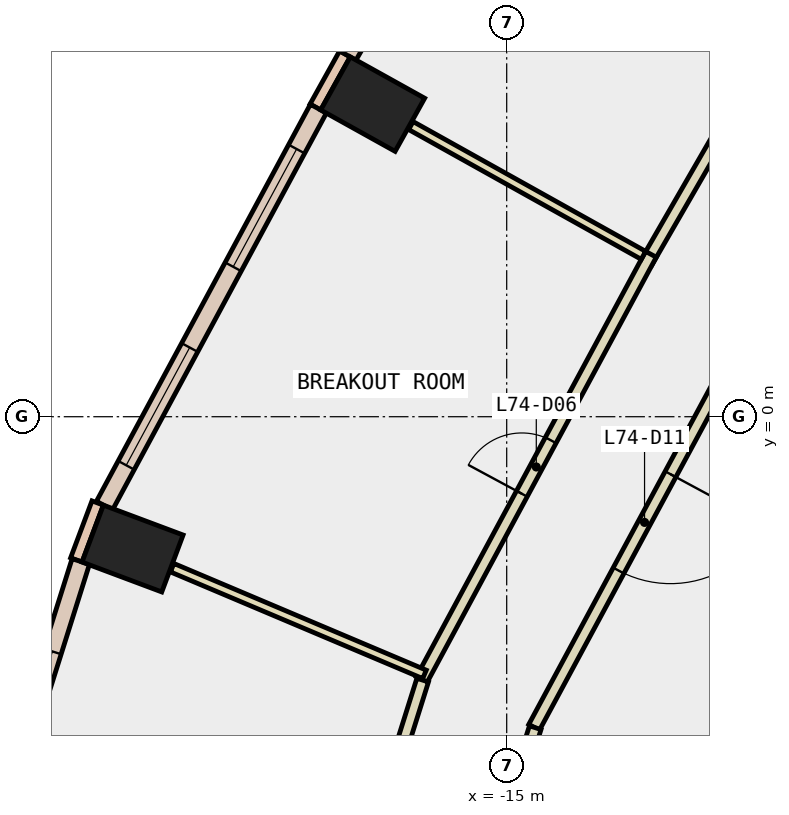
"""IFC4 building model, lengths in metres.
Left out: names, types, materials, properties, quantities, classifications, styles, units other than length and angle.
Written with IfcOpenShell. Run it as: python <this file> out.ifc"""

import sys

from ifc_helpers import new_model, si_unit, direction, frame, frame_2d, origin, origin_2d, place, context, subcontext, project, spatial, rectangle, extrude, element, fill, save


model = new_model("IFC4")
c1 = context("Model", 3, precision=1e-05, world=origin(), true_north=direction((0.0, 1.0)))
c2 = subcontext(c1, "Body", "Model", "MODEL_VIEW")
j1 = project(units=[si_unit("LENGTHUNIT", "METRE"), si_unit("PLANEANGLEUNIT", "RADIAN")], contexts=[c1])
p1 = place(None, origin())
s1 = spatial("IfcSite", under=j1, at=p1, CompositionType="ELEMENT")
p2 = place(p1, origin())
s2 = spatial("IfcBuilding", under=s1, at=p2, CompositionType="ELEMENT")
p3 = place(p2, frame((0.0, 0.0, 315.2)))
s3 = spatial("IfcBuildingStorey", under=s2, at=p3, CompositionType="ELEMENT", Elevation=315.2)
for number, where, z_axis, x_axis in (
    (1, (-17.204, 5.141, -0.34), (0.0, 0.0, 1.0), (0.486, 0.874, 0.0)),
    (2, (-21.153, -2.168, -0.34), (0.0, 0.0, 1.0), (0.351, 0.936, 0.0)),
):
    element("IfcColumn", number, at=place(p3, frame(where, z_axis=z_axis, x_axis=x_axis)), inside=s3, PredefinedType="COLUMN", context=c2, shape_type="SweptSolid", body=[
        extrude(rectangle(XDim=1.0, YDim=1.4, at=origin_2d()), origin(), (0.0, 0.0, 1.0), 3.6),
    ])
p4 = place(p3, frame((-6.279, -3.625, -0.34), z_axis=(0.0, 0.0, 1.0), x_axis=(-0.866017533419, -0.500013631625, 0.0)))
e3 = element("IfcWall", 3, at=p4, inside=s3, PredefinedType="SHEAR", context=c2, shape_type="SweptSolid", body=[
    extrude(rectangle(XDim=9.0, YDim=0.8, at=frame_2d((4.5, 0.0))), origin(), (0.0, 0.0, 1.0), 3.6),
])
p5 = place(p3, frame((-17.661, 5.966, 0.0), z_axis=(0.0, 0.0, 1.0), x_axis=(-0.486036693078, -0.873938403425, 0.0)))
e4 = element("IfcWall", 4, at=p5, inside=s3, PredefinedType="STANDARD", context=c2, shape_type="SweptSolid", body=[
    extrude(rectangle(XDim=1.0, YDim=0.2, at=frame_2d((0.5, 0.0))), origin(), (0.0, 0.0, 1.0), 3.26),
])
p6 = place(p3, frame((-21.727, -1.419, 0.0), z_axis=(0.0, 0.0, 1.0), x_axis=(-0.350962844851, -0.936389385637, 0.0)))
e5 = element("IfcWall", 5, at=p6, inside=s3, PredefinedType="STANDARD", context=c2, shape_type="SweptSolid", body=[
    extrude(rectangle(XDim=1.0, YDim=0.2, at=frame_2d((0.5, 0.0))), origin(), (0.0, 0.0, 1.0), 3.26),
])
p7 = place(p3, frame((-13.947, 12.283, 0.0), z_axis=(0.0, 0.0, 1.0), x_axis=(-0.499923391538, -0.866069629183, 0.0)))
e6 = element("IfcWall", 6, at=p7, inside=s3, PredefinedType="STANDARD", context=c2, shape_type="SweptSolid", body=[
    extrude(rectangle(XDim=7.327, YDim=0.3, at=frame_2d((3.664, 0.0))), origin(), (0.0, 0.0, 1.0), 3.26),
])
p8 = place(p7, frame((0.732, 0.0, 0.9)))
e7 = element("IfcOpeningElement", 7, at=p8, cuts=e6, PredefinedType="OPENING", context=c2, shape_type="SweptSolid", body=[
    extrude(rectangle(XDim=2.2, YDim=2.0, at=frame_2d((1.1, 1.0))), frame((0.0, 0.16, 0.0), z_axis=(0.0, -1.0, 0.0), x_axis=(1.0, 0.0, 0.0)), (0.0, 0.0, 1.0), 0.32),
])
p9 = place(p7, frame((4.395, 0.0, 0.9)))
e8 = element("IfcOpeningElement", 8, at=p9, cuts=e6, PredefinedType="OPENING", context=c2, shape_type="SweptSolid", body=[
    extrude(rectangle(XDim=2.2, YDim=2.0, at=frame_2d((1.1, 1.0))), frame((0.0, 0.16, 0.0), z_axis=(0.0, -1.0, 0.0), x_axis=(1.0, 0.0, 0.0)), (0.0, 0.0, 1.0), 0.32),
])
p10 = place(p3, frame((-18.097, 5.066, 0.0), z_axis=(0.0, 0.0, 1.0), x_axis=(-0.474421773145, -0.880297666228, 0.0)))
e9 = element("IfcWall", 9, at=p10, inside=s3, PredefinedType="STANDARD", context=c2, shape_type="SweptSolid", body=[
    extrude(rectangle(XDim=7.416, YDim=0.3, at=frame_2d((3.708, 0.0))), origin(), (0.0, 0.0, 1.0), 3.26),
])
p11 = place(p10, frame((0.754, 0.0, 0.9)))
e10 = element("IfcOpeningElement", 10, at=p11, cuts=e9, PredefinedType="OPENING", context=c2, shape_type="SweptSolid", body=[
    extrude(rectangle(XDim=2.2, YDim=2.0, at=frame_2d((1.1, 1.0))), frame((0.0, 0.16, 0.0), z_axis=(0.0, -1.0, 0.0), x_axis=(1.0, 0.0, 0.0)), (0.0, 0.0, 1.0), 0.32),
])
p12 = place(p10, frame((4.462, 0.0, 0.9)))
e11 = element("IfcOpeningElement", 11, at=p12, cuts=e9, PredefinedType="OPENING", context=c2, shape_type="SweptSolid", body=[
    extrude(rectangle(XDim=2.2, YDim=2.0, at=frame_2d((1.1, 1.0))), frame((0.0, 0.16, 0.0), z_axis=(0.0, -1.0, 0.0), x_axis=(1.0, 0.0, 0.0)), (0.0, 0.0, 1.0), 0.32),
])
p13 = place(p3, frame((-22.005, -2.381, 0.0), z_axis=(0.0, 0.0, 1.0), x_axis=(-0.300534385574, -0.953770980418, 0.0)))
e12 = element("IfcWall", 12, at=p13, inside=s3, PredefinedType="STANDARD", context=c2, shape_type="SweptSolid", body=[
    extrude(rectangle(XDim=4.502, YDim=0.3, at=frame_2d((2.251, 0.0))), origin(), (0.0, 0.0, 1.0), 3.26),
])
p14 = place(p13, frame((1.551, 0.0, 0.9)))
e13 = element("IfcOpeningElement", 13, at=p14, cuts=e12, PredefinedType="OPENING", context=c2, shape_type="SweptSolid", body=[
    extrude(rectangle(XDim=1.4, YDim=2.0, at=frame_2d((0.7, 1.0))), frame((0.0, 0.16, 0.0), z_axis=(0.0, -1.0, 0.0), x_axis=(1.0, 0.0, 0.0)), (0.0, 0.0, 1.0), 0.32),
])
p15 = place(p3, frame((-10.917, 1.631, 0.0), z_axis=(0.0, 0.0, 1.0), x_axis=(-0.47449538478, -0.880257990491, 0.0)))
e14 = element("IfcWall", 14, at=p15, inside=s3, PredefinedType="PARTITIONING", context=c2, shape_type="SweptSolid", body=[
    extrude(rectangle(XDim=7.655, YDim=0.2, at=frame_2d((3.827, 0.0))), origin(), (0.0, 0.0, 1.0), 3.26),
])
p16 = place(p15, frame((2.927, 0.0, 0.0)))
e15 = element("IfcOpeningElement", 15, at=p16, cuts=e14, PredefinedType="OPENING", context=c2, shape_type="SweptSolid", body=[
    extrude(rectangle(XDim=1.8, YDim=2.1, at=frame_2d((0.9, 1.05))), frame((0.0, 0.11, 0.0), z_axis=(0.0, -1.0, 0.0), x_axis=(1.0, 0.0, 0.0)), (0.0, 0.0, 1.0), 0.22),
])
p17 = place(p3, frame((-14.531, -5.114, 0.0), z_axis=(0.0, 0.0, 1.0), x_axis=(-0.300501248013, -0.953781421471, 0.0)))
e16 = element("IfcWall", 16, at=p17, inside=s3, PredefinedType="PARTITIONING", context=c2, shape_type="SweptSolid", body=[
    extrude(rectangle(XDim=2.559, YDim=0.2, at=frame_2d((1.28, 0.0))), origin(), (0.0, 0.0, 1.0), 3.26),
])
p18 = place(p3, frame((-12.701, 2.54, 0.0), z_axis=(0.0, 0.0, 1.0), x_axis=(0.499946799636, 0.86605611685, 0.0)))
e17 = element("IfcWall", 17, at=p18, inside=s3, PredefinedType="PARTITIONING", context=c2, shape_type="SweptSolid", body=[
    extrude(rectangle(XDim=8.227, YDim=0.2, at=frame_2d((4.114, 0.0))), origin(), (0.0, 0.0, 1.0), 3.26),
])
p19 = place(p18, frame((3.613, 0.0, 0.0)))
e18 = element("IfcOpeningElement", 18, at=p19, cuts=e17, PredefinedType="OPENING", context=c2, shape_type="SweptSolid", body=[
    extrude(rectangle(XDim=1.0, YDim=2.1, at=frame_2d((0.5, 1.05))), frame((0.0, 0.11, 0.0), z_axis=(0.0, -1.0, 0.0), x_axis=(1.0, 0.0, 0.0)), (0.0, 0.0, 1.0), 0.22),
])
p20 = place(p3, frame((-16.399, -4.325, 0.0), z_axis=(0.0, 0.0, 1.0), x_axis=(0.474489967676, 0.880260910512, 0.0)))
e19 = element("IfcWall", 19, at=p20, inside=s3, PredefinedType="PARTITIONING", context=c2, shape_type="SweptSolid", body=[
    extrude(rectangle(XDim=7.948, YDim=0.2, at=frame_2d((3.974, 0.0))), origin(), (0.0, 0.0, 1.0), 3.26),
])
p21 = place(p20, frame((3.474, 0.0, 0.0)))
e20 = element("IfcOpeningElement", 20, at=p21, cuts=e19, PredefinedType="OPENING", context=c2, shape_type="SweptSolid", body=[
    extrude(rectangle(XDim=1.0, YDim=2.1, at=frame_2d((0.5, 1.05))), frame((0.0, 0.11, 0.0), z_axis=(0.0, -1.0, 0.0), x_axis=(1.0, 0.0, 0.0)), (0.0, 0.0, 1.0), 0.22),
])
p22 = place(p3, frame((-17.375, -7.487, 0.0), z_axis=(0.0, 0.0, 1.0), x_axis=(0.300195088058, 0.953877827138, 0.0)))
e21 = element("IfcWall", 21, at=p22, inside=s3, PredefinedType="PARTITIONING", context=c2, shape_type="SweptSolid", body=[
    extrude(rectangle(XDim=3.308, YDim=0.2, at=frame_2d((1.654, 0.0))), origin(), (0.0, 0.0, 1.0), 3.26),
])
p23 = place(p3, frame((-12.751, 2.654, 0.0), z_axis=(0.0, 0.0, 1.0), x_axis=(-0.873277679945, 0.487222837837, 0.0)))
e22 = element("IfcWall", 22, at=p23, inside=s3, PredefinedType="PARTITIONING", context=c2, shape_type="SweptSolid", body=[
    extrude(rectangle(XDim=4.38, YDim=0.15, at=frame_2d((2.19, 0.0))), origin(), (0.0, 0.0, 1.0), 3.26),
])
p24 = place(p3, frame((-16.352, -4.237, 0.0), z_axis=(0.0, 0.0, 1.0), x_axis=(-0.921092849348, 0.389342988738, 0.0)))
e23 = element("IfcWall", 23, at=p24, inside=s3, PredefinedType="PARTITIONING", context=c2, shape_type="SweptSolid", body=[
    extrude(rectangle(XDim=4.505, YDim=0.15, at=frame_2d((2.253, 0.0))), origin(), (0.0, 0.0, 1.0), 3.26),
])
p25 = place(p11, origin())
e24 = element("IfcWindow", 24, at=p25, inside=s3, PartitioningType="SINGLE_PANEL", PredefinedType="WINDOW", context=c2, shape_type="SweptSolid", body=[
    extrude(rectangle(XDim=2.2, YDim=2.0, at=frame_2d((1.1, 1.0))), frame((0.0, 0.03, 0.0), z_axis=(0.0, -1.0, 0.0), x_axis=(1.0, 0.0, 0.0)), (0.0, 0.0, 1.0), 0.06),
])
fill(e10, e24)
p26 = place(p12, origin())
e25 = element("IfcWindow", 25, at=p26, inside=s3, PartitioningType="SINGLE_PANEL", PredefinedType="WINDOW", context=c2, shape_type="SweptSolid", body=[
    extrude(rectangle(XDim=2.2, YDim=2.0, at=frame_2d((1.1, 1.0))), frame((0.0, 0.03, 0.0), z_axis=(0.0, -1.0, 0.0), x_axis=(1.0, 0.0, 0.0)), (0.0, 0.0, 1.0), 0.06),
])
fill(e11, e25)
p27 = place(p14, origin())
e26 = element("IfcWindow", 26, at=p27, inside=s3, PartitioningType="SINGLE_PANEL", PredefinedType="WINDOW", context=c2, shape_type="SweptSolid", body=[
    extrude(rectangle(XDim=1.4, YDim=2.0, at=frame_2d((0.7, 1.0))), frame((0.0, 0.03, 0.0), z_axis=(0.0, -1.0, 0.0), x_axis=(1.0, 0.0, 0.0)), (0.0, 0.0, 1.0), 0.06),
])
fill(e13, e26)
p28 = place(p21, origin())
e27 = element("IfcDoor", 27, at=p28, inside=s3, OperationType="SINGLE_SWING_LEFT", PredefinedType="DOOR", context=c2, shape_type="SweptSolid", body=[
    extrude(rectangle(XDim=1.0, YDim=2.1, at=frame_2d((0.5, 1.05))), frame((0.0, 0.025, 0.0), z_axis=(0.0, -1.0, 0.0), x_axis=(1.0, 0.0, 0.0)), (0.0, 0.0, 1.0), 0.05),
])
fill(e20, e27)
p29 = place(p16, origin())
e28 = element("IfcDoor", 28, at=p29, inside=s3, OperationType="DOUBLE_DOOR_SINGLE_SWING", PredefinedType="DOOR", context=c2, shape_type="SweptSolid", body=[
    extrude(rectangle(XDim=1.8, YDim=2.1, at=frame_2d((0.9, 1.05))), frame((0.0, 0.025, 0.0), z_axis=(0.0, -1.0, 0.0), x_axis=(1.0, 0.0, 0.0)), (0.0, 0.0, 1.0), 0.05),
])
fill(e15, e28)
save(model, sys.argv[1])
